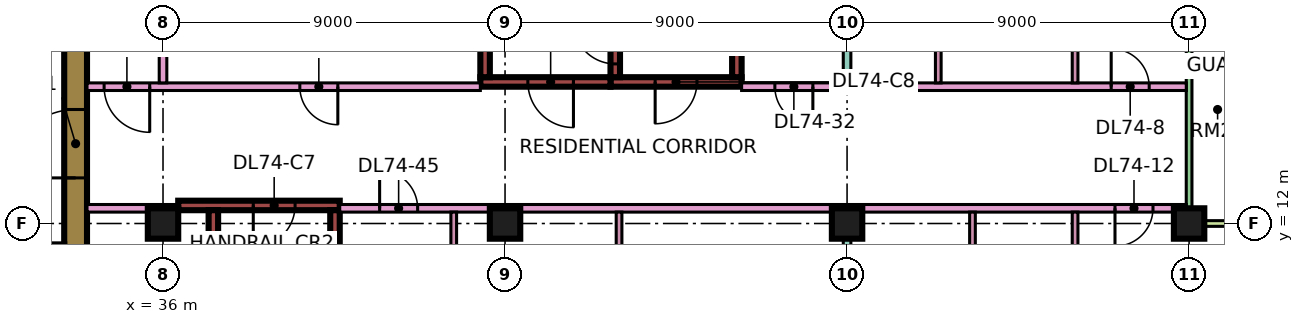
"""IFC4 building model, lengths in metres.
Left out: names, types, materials, properties, quantities, classifications, styles, units other than length and angle.
Written with IfcOpenShell. Run it as: python <this file> out.ifc"""

import sys

from ifc_helpers import new_model, si_unit, direction, frame, frame_2d, origin, origin_2d, place, context, subcontext, project, spatial, rectangle, extrude, element, fill, save


model = new_model("IFC4")
c1 = context("Model", 3, precision=1e-05, world=origin(), true_north=direction((0.0, 1.0)))
c2 = subcontext(c1, "Body", "Model", "MODEL_VIEW")
j1 = project(units=[si_unit("LENGTHUNIT", "METRE"), si_unit("PLANEANGLEUNIT", "RADIAN")], contexts=[c1])
p1 = place(None, origin())
s1 = spatial("IfcSite", under=j1, at=p1, CompositionType="ELEMENT")
p2 = place(p1, origin())
s2 = spatial("IfcBuilding", under=s1, at=p2, CompositionType="ELEMENT")
p3 = place(p2, frame((0.0, 0.0, 314.65)))
s3 = spatial("IfcBuildingStorey", under=s2, at=p3, CompositionType="ELEMENT", Elevation=314.65)
for number, where, z_axis, x_axis in (
    (1, (36.0, 12.0, 0.0), (0.0, 0.0, 1.0), (1.0, 0.0, 0.0)),
    (2, (45.0, 12.0, 0.0), (0.0, 0.0, 1.0), (1.0, 0.0, 0.0)),
    (3, (54.0, 12.0, 0.0), (0.0, 0.0, 1.0), (1.0, 0.0, 0.0)),
    (4, (63.0, 12.0, 0.0), (0.0, 0.0, 1.0), (1.0, 0.0, 0.0)),
):
    element("IfcColumn", number, at=place(p3, frame(where, z_axis=z_axis, x_axis=x_axis)), inside=s3, PredefinedType="COLUMN", context=c2, shape_type="SweptSolid", body=[
        extrude(rectangle(XDim=0.8, YDim=0.8, at=origin_2d()), origin(), (0.0, 0.0, 1.0), 3.75),
    ])
p4 = place(p3, frame((33.7, 7.6, 0.0), z_axis=(0.0, 0.0, 1.0), x_axis=(0.0, 1.0, 0.0)))
e5 = element("IfcWall", 5, at=p4, inside=s3, PredefinedType="SHEAR", context=c2, shape_type="SweptSolid", body=[
    extrude(rectangle(XDim=11.8, YDim=0.6, at=frame_2d((5.9, 0.0))), origin(), (0.0, 0.0, 1.0), 3.75),
])
p5 = place(p4, frame((5.6, 0.0, 0.0)))
e6 = element("IfcOpeningElement", 6, at=p5, cuts=e5, PredefinedType="OPENING", context=c2, shape_type="SweptSolid", body=[
    extrude(rectangle(XDim=1.8, YDim=2.4, at=frame_2d((0.9, 1.2))), frame((0.0, 0.31, 0.0), z_axis=(0.0, -1.0, 0.0), x_axis=(1.0, 0.0, 0.0)), (0.0, 0.0, 1.0), 0.62),
])
p6 = place(p3, frame((36.4, 12.475, 0.0), z_axis=(0.0, 0.0, 1.0), x_axis=(1.0, 0.0, 0.0)))
e7 = element("IfcWall", 7, at=p6, inside=s3, PredefinedType="SHEAR", context=c2, shape_type="SweptSolid", body=[
    extrude(rectangle(XDim=4.25, YDim=0.25, at=frame_2d((2.125, 0.0))), origin(), (0.0, 0.0, 1.0), 3.75),
])
p7 = place(p6, frame((1.975, 0.0, 0.0)))
e8 = element("IfcOpeningElement", 8, at=p7, cuts=e7, PredefinedType="OPENING", context=c2, shape_type="SweptSolid", body=[
    extrude(rectangle(XDim=1.1, YDim=2.2, at=frame_2d((0.55, 1.1))), frame((0.0, 0.135, 0.0), z_axis=(0.0, -1.0, 0.0), x_axis=(1.0, 0.0, 0.0)), (0.0, 0.0, 1.0), 0.27),
])
for number, where, z_axis, x_axis in (
    (9, (37.325, 5.85, 0.0), (0.0, 0.0, 1.0), (0.0, 1.0, 0.0)),
    (10, (40.525, 5.85, 0.0), (0.0, 0.0, 1.0), (0.0, 1.0, 0.0)),
):
    element("IfcWall", number, at=place(p3, frame(where, z_axis=z_axis, x_axis=x_axis)), inside=s3, PredefinedType="SHEAR", context=c2, shape_type="SweptSolid", body=[
        extrude(rectangle(XDim=6.5, YDim=0.25, at=frame_2d((3.25, 0.0))), origin(), (0.0, 0.0, 1.0), 3.75),
    ])
p8 = place(p3, frame((47.775, 15.725, 0.0), z_axis=(0.0, 0.0, 1.0), x_axis=(1.0, 0.0, 0.0)))
e11 = element("IfcWall", 11, at=p8, inside=s3, PredefinedType="SHEAR", context=c2, shape_type="SweptSolid", body=[
    extrude(rectangle(XDim=3.45, YDim=0.25, at=frame_2d((1.725, 0.0))), origin(), (0.0, 0.0, 1.0), 3.75),
])
p9 = place(p8, frame((1.175, 0.0, 0.0)))
e12 = element("IfcOpeningElement", 12, at=p9, cuts=e11, PredefinedType="OPENING", context=c2, shape_type="SweptSolid", body=[
    extrude(rectangle(XDim=1.1, YDim=2.2, at=frame_2d((0.55, 1.1))), frame((0.0, 0.135, 0.0), z_axis=(0.0, -1.0, 0.0), x_axis=(1.0, 0.0, 0.0)), (0.0, 0.0, 1.0), 0.27),
])
p10 = place(p3, frame((47.9, 15.85, 0.0), z_axis=(0.0, 0.0, 1.0), x_axis=(0.0, 1.0, 0.0)))
e13 = element("IfcWall", 13, at=p10, inside=s3, PredefinedType="SHEAR", context=c2, shape_type="SweptSolid", body=[
    extrude(rectangle(XDim=6.5, YDim=0.25, at=frame_2d((3.25, 0.0))), origin(), (0.0, 0.0, 1.0), 3.75),
])
p11 = place(p10, frame((0.35, 0.0, 0.0)))
e14 = element("IfcOpeningElement", 14, at=p11, cuts=e13, PredefinedType="OPENING", context=c2, shape_type="SweptSolid", body=[
    extrude(rectangle(XDim=1.1, YDim=2.2, at=frame_2d((0.55, 1.1))), frame((0.0, 0.135, 0.0), z_axis=(0.0, -1.0, 0.0), x_axis=(1.0, 0.0, 0.0)), (0.0, 0.0, 1.0), 0.27),
])
p12 = place(p3, frame((51.1, 15.85, 0.0), z_axis=(0.0, 0.0, 1.0), x_axis=(0.0, 1.0, 0.0)))
e15 = element("IfcWall", 15, at=p12, inside=s3, PredefinedType="SHEAR", context=c2, shape_type="SweptSolid", body=[
    extrude(rectangle(XDim=6.5, YDim=0.25, at=frame_2d((3.25, 0.0))), origin(), (0.0, 0.0, 1.0), 3.75),
])
p13 = place(p3, frame((44.35, 15.725, 0.0), z_axis=(0.0, 0.0, 1.0), x_axis=(1.0, 0.0, 0.0)))
e16 = element("IfcWall", 16, at=p13, inside=s3, PredefinedType="SHEAR", context=c2, shape_type="SweptSolid", body=[
    extrude(rectangle(XDim=3.425, YDim=0.25, at=frame_2d((1.712, 0.0))), origin(), (0.0, 0.0, 1.0), 3.75),
])
p14 = place(p13, frame((1.25, 0.0, 0.0)))
e17 = element("IfcOpeningElement", 17, at=p14, cuts=e16, PredefinedType="OPENING", context=c2, shape_type="SweptSolid", body=[
    extrude(rectangle(XDim=1.2, YDim=2.2, at=frame_2d((0.6, 1.1))), frame((0.0, 0.135, 0.0), z_axis=(0.0, -1.0, 0.0), x_axis=(1.0, 0.0, 0.0)), (0.0, 0.0, 1.0), 0.27),
])
p15 = place(p3, frame((44.475, 15.85, 0.0), z_axis=(0.0, 0.0, 1.0), x_axis=(0.0, 1.0, 0.0)))
e18 = element("IfcWall", 18, at=p15, inside=s3, PredefinedType="SHEAR", context=c2, shape_type="SweptSolid", body=[
    extrude(rectangle(XDim=6.5, YDim=0.25, at=frame_2d((3.25, 0.0))), origin(), (0.0, 0.0, 1.0), 3.75),
])
p16 = place(p15, frame((1.75, 0.0, 0.0)))
e19 = element("IfcOpeningElement", 19, at=p16, cuts=e18, PredefinedType="OPENING", context=c2, shape_type="SweptSolid", body=[
    extrude(rectangle(XDim=1.1, YDim=2.2, at=frame_2d((0.55, 1.1))), frame((0.0, 0.135, 0.0), z_axis=(0.0, -1.0, 0.0), x_axis=(1.0, 0.0, 0.0)), (0.0, 0.0, 1.0), 0.27),
])
p17 = place(p15, frame((4.3, 0.0, 0.0)))
e20 = element("IfcOpeningElement", 20, at=p17, cuts=e18, PredefinedType="OPENING", context=c2, shape_type="SweptSolid", body=[
    extrude(rectangle(XDim=1.1, YDim=2.2, at=frame_2d((0.55, 1.1))), frame((0.0, 0.135, 0.0), z_axis=(0.0, -1.0, 0.0), x_axis=(1.0, 0.0, 0.0)), (0.0, 0.0, 1.0), 0.27),
])
p18 = place(p3, frame((63.0, 12.075, 0.0), z_axis=(0.0, 0.0, 1.0), x_axis=(0.0, 1.0, 0.0)))
e21 = element("IfcWall", 21, at=p18, inside=s3, PredefinedType="SOLIDWALL", context=c2, shape_type="SweptSolid", body=[
    extrude(rectangle(XDim=10.35, YDim=0.15, at=frame_2d((5.175, 0.0))), origin(), (0.0, 0.0, 1.0), 3.35),
])
p19 = place(p18, frame((6.038, 0.0, 0.0)))
e22 = element("IfcOpeningElement", 22, at=p19, cuts=e21, PredefinedType="OPENING", context=c2, shape_type="SweptSolid", body=[
    extrude(rectangle(XDim=1.8, YDim=2.4, at=frame_2d((0.9, 1.2))), frame((0.0, 0.085, 0.0), z_axis=(0.0, -1.0, 0.0), x_axis=(1.0, 0.0, 0.0)), (0.0, 0.0, 1.0), 0.17),
])
p20 = place(p3, frame((64.5, 12.0, 0.0), z_axis=(0.0, 0.0, 1.0), x_axis=(-1.0, 0.0, 0.0)))
e23 = element("IfcWall", 23, at=p20, inside=s3, PredefinedType="SOLIDWALL", context=c2, shape_type="SweptSolid", body=[
    extrude(rectangle(XDim=1.5, YDim=0.15, at=frame_2d((0.75, 0.0))), origin(), (0.0, 0.0, 1.0), 3.35),
])
p21 = place(p3, frame((34.0, 12.4, 0.0), z_axis=(0.0, 0.0, 1.0), x_axis=(1.0, 0.0, 0.0)))
e24 = element("IfcWall", 24, at=p21, inside=s3, PredefinedType="PARTITIONING", context=c2, shape_type="SweptSolid", body=[
    extrude(rectangle(XDim=2.401, YDim=0.2, at=frame_2d((1.2, 0.0))), origin(), (0.0, 0.0, 1.0), 3.35),
])
p22 = place(p3, frame((34.0, 15.6, 0.0), z_axis=(0.0, 0.0, 1.0), x_axis=(1.0, 0.0, 0.0)))
e25 = element("IfcWall", 25, at=p22, inside=s3, PredefinedType="PARTITIONING", context=c2, shape_type="SweptSolid", body=[
    extrude(rectangle(XDim=10.35, YDim=0.2, at=frame_2d((5.175, 0.0))), origin(), (0.0, 0.0, 1.0), 3.35),
])
p23 = place(p22, frame((5.6, 0.0, 0.0)))
e26 = element("IfcOpeningElement", 26, at=p23, cuts=e25, PredefinedType="OPENING", context=c2, shape_type="SweptSolid", body=[
    extrude(rectangle(XDim=1.0, YDim=2.1, at=frame_2d((0.5, 1.05))), frame((0.0, 0.11, 0.0), z_axis=(0.0, -1.0, 0.0), x_axis=(1.0, 0.0, 0.0)), (0.0, 0.0, 1.0), 0.22),
])
p24 = place(p22, frame((0.45, 0.0, 0.0)))
e27 = element("IfcOpeningElement", 27, at=p24, cuts=e25, PredefinedType="OPENING", context=c2, shape_type="SweptSolid", body=[
    extrude(rectangle(XDim=1.2, YDim=2.1, at=frame_2d((0.6, 1.05))), frame((0.0, 0.11, 0.0), z_axis=(0.0, -1.0, 0.0), x_axis=(1.0, 0.0, 0.0)), (0.0, 0.0, 1.0), 0.22),
])
p25 = place(p3, frame((36.0, 15.7, 0.0), z_axis=(0.0, 0.0, 1.0), x_axis=(0.0, 1.0, 0.0)))
e28 = element("IfcWall", 28, at=p25, inside=s3, PredefinedType="PARTITIONING", context=c2, shape_type="SweptSolid", body=[
    extrude(rectangle(XDim=8.3, YDim=0.2, at=frame_2d((4.15, 0.0))), origin(), (0.0, 0.0, 1.0), 3.35),
])
p26 = place(p3, frame((40.65, 12.4, 0.0), z_axis=(0.0, 0.0, 1.0), x_axis=(1.0, 0.0, 0.0)))
e29 = element("IfcWall", 29, at=p26, inside=s3, PredefinedType="PARTITIONING", context=c2, shape_type="SweptSolid", body=[
    extrude(rectangle(XDim=22.276, YDim=0.2, at=frame_2d((11.138, 0.0))), origin(), (0.0, 0.0, 1.0), 3.35),
])
p27 = place(p26, frame((20.4, 0.0, 0.0)))
e30 = element("IfcOpeningElement", 30, at=p27, cuts=e29, PredefinedType="OPENING", context=c2, shape_type="SweptSolid", body=[
    extrude(rectangle(XDim=1.0, YDim=2.1, at=frame_2d((0.5, 1.05))), frame((0.0, 0.11, 0.0), z_axis=(0.0, -1.0, 0.0), x_axis=(1.0, 0.0, 0.0)), (0.0, 0.0, 1.0), 0.22),
])
p28 = place(p26, frame((1.05, 0.0, 0.0)))
e31 = element("IfcOpeningElement", 31, at=p28, cuts=e29, PredefinedType="OPENING", context=c2, shape_type="SweptSolid", body=[
    extrude(rectangle(XDim=1.0, YDim=2.1, at=frame_2d((0.5, 1.05))), frame((0.0, 0.11, 0.0), z_axis=(0.0, -1.0, 0.0), x_axis=(1.0, 0.0, 0.0)), (0.0, 0.0, 1.0), 0.22),
])
p29 = place(p3, frame((43.65, 5.975, 0.0), z_axis=(0.0, 0.0, 1.0), x_axis=(0.0, 1.0, 0.0)))
e32 = element("IfcWall", 32, at=p29, inside=s3, PredefinedType="PARTITIONING", context=c2, shape_type="SweptSolid", body=[
    extrude(rectangle(XDim=6.325, YDim=0.15, at=frame_2d((3.163, 0.0))), origin(), (0.0, 0.0, 1.0), 3.35),
])
p30 = place(p29, frame((4.275, 0.0, 0.0)))
e33 = element("IfcOpeningElement", 33, at=p30, cuts=e32, PredefinedType="OPENING", context=c2, shape_type="SweptSolid", body=[
    extrude(rectangle(XDim=0.9, YDim=2.1, at=frame_2d((0.45, 1.05))), frame((0.0, 0.085, 0.0), z_axis=(0.0, -1.0, 0.0), x_axis=(1.0, 0.0, 0.0)), (0.0, 0.0, 1.0), 0.17),
])
p31 = place(p3, frame((48.0, 5.975, 0.0), z_axis=(0.0, 0.0, 1.0), x_axis=(0.0, 1.0, 0.0)))
e34 = element("IfcWall", 34, at=p31, inside=s3, PredefinedType="PARTITIONING", context=c2, shape_type="SweptSolid", body=[
    extrude(rectangle(XDim=6.325, YDim=0.15, at=frame_2d((3.163, 0.0))), origin(), (0.0, 0.0, 1.0), 3.35),
])
p32 = place(p3, frame((51.225, 15.6, 0.0), z_axis=(0.0, 0.0, 1.0), x_axis=(1.0, 0.0, 0.0)))
e35 = element("IfcWall", 35, at=p32, inside=s3, PredefinedType="PARTITIONING", context=c2, shape_type="SweptSolid", body=[
    extrude(rectangle(XDim=11.701, YDim=0.2, at=frame_2d((5.851, 0.0))), origin(), (0.0, 0.0, 1.0), 3.35),
])
p33 = place(p32, frame((9.725, 0.0, 0.0)))
e36 = element("IfcOpeningElement", 36, at=p33, cuts=e35, PredefinedType="OPENING", context=c2, shape_type="SweptSolid", body=[
    extrude(rectangle(XDim=1.0, YDim=2.1, at=frame_2d((0.5, 1.05))), frame((0.0, 0.11, 0.0), z_axis=(0.0, -1.0, 0.0), x_axis=(1.0, 0.0, 0.0)), (0.0, 0.0, 1.0), 0.22),
])
p34 = place(p32, frame((0.875, 0.0, 0.0)))
e37 = element("IfcOpeningElement", 37, at=p34, cuts=e35, PredefinedType="OPENING", context=c2, shape_type="SweptSolid", body=[
    extrude(rectangle(XDim=1.0, YDim=2.1, at=frame_2d((0.5, 1.05))), frame((0.0, 0.11, 0.0), z_axis=(0.0, -1.0, 0.0), x_axis=(1.0, 0.0, 0.0)), (0.0, 0.0, 1.0), 0.22),
])
p35 = place(p3, frame((54.0, 0.0, 0.0), z_axis=(0.0, 0.0, 1.0), x_axis=(0.0, 1.0, 0.0)))
e38 = element("IfcWall", 38, at=p35, inside=s3, PredefinedType="PARTITIONING", context=c2, shape_type="SweptSolid", body=[
    extrude(rectangle(XDim=12.3, YDim=0.2, at=frame_2d((6.15, 0.0))), origin(), (0.0, 0.0, 1.0), 3.35),
])
p36 = place(p3, frame((54.0, 15.7, 0.0), z_axis=(0.0, 0.0, 1.0), x_axis=(0.0, 1.0, 0.0)))
e39 = element("IfcWall", 39, at=p36, inside=s3, PredefinedType="PARTITIONING", context=c2, shape_type="SweptSolid", body=[
    extrude(rectangle(XDim=8.3, YDim=0.2, at=frame_2d((4.15, 0.0))), origin(), (0.0, 0.0, 1.0), 3.35),
])
p37 = place(p3, frame((56.4, 15.7, 0.0), z_axis=(0.0, 0.0, 1.0), x_axis=(0.0, 1.0, 0.0)))
e40 = element("IfcWall", 40, at=p37, inside=s3, PredefinedType="PARTITIONING", context=c2, shape_type="SweptSolid", body=[
    extrude(rectangle(XDim=2.525, YDim=0.15, at=frame_2d((1.263, 0.0))), origin(), (0.0, 0.0, 1.0), 3.35),
])
p38 = place(p3, frame((57.3, 7.075, 0.0), z_axis=(0.0, 0.0, 1.0), x_axis=(0.0, 1.0, 0.0)))
e41 = element("IfcWall", 41, at=p38, inside=s3, PredefinedType="PARTITIONING", context=c2, shape_type="SweptSolid", body=[
    extrude(rectangle(XDim=5.225, YDim=0.15, at=frame_2d((2.613, 0.0))), origin(), (0.0, 0.0, 1.0), 3.35),
])
p39 = place(p3, frame((60.0, 7.075, 0.0), z_axis=(0.0, 0.0, 1.0), x_axis=(0.0, 1.0, 0.0)))
e42 = element("IfcWall", 42, at=p39, inside=s3, PredefinedType="PARTITIONING", context=c2, shape_type="SweptSolid", body=[
    extrude(rectangle(XDim=5.225, YDim=0.15, at=frame_2d((2.613, 0.0))), origin(), (0.0, 0.0, 1.0), 3.35),
])
p40 = place(p39, frame((2.275, 0.0, 0.0)))
e43 = element("IfcOpeningElement", 43, at=p40, cuts=e42, PredefinedType="OPENING", context=c2, shape_type="SweptSolid", body=[
    extrude(rectangle(XDim=0.8, YDim=2.1, at=frame_2d((0.4, 1.05))), frame((0.0, 0.085, 0.0), z_axis=(0.0, -1.0, 0.0), x_axis=(1.0, 0.0, 0.0)), (0.0, 0.0, 1.0), 0.17),
])
p41 = place(p3, frame((60.0, 15.7, 0.0), z_axis=(0.0, 0.0, 1.0), x_axis=(0.0, 1.0, 0.0)))
e44 = element("IfcWall", 44, at=p41, inside=s3, PredefinedType="PARTITIONING", context=c2, shape_type="SweptSolid", body=[
    extrude(rectangle(XDim=2.525, YDim=0.15, at=frame_2d((1.263, 0.0))), origin(), (0.0, 0.0, 1.0), 3.35),
])
p42 = place(p41, frame((0.9, 0.0, 0.0)))
e45 = element("IfcOpeningElement", 45, at=p42, cuts=e44, PredefinedType="OPENING", context=c2, shape_type="SweptSolid", body=[
    extrude(rectangle(XDim=0.8, YDim=2.1, at=frame_2d((0.4, 1.05))), frame((0.0, 0.085, 0.0), z_axis=(0.0, -1.0, 0.0), x_axis=(1.0, 0.0, 0.0)), (0.0, 0.0, 1.0), 0.17),
])
p43 = place(p5, origin())
e46 = element("IfcDoor", 46, at=p43, inside=s3, OperationType="DOUBLE_DOOR_SINGLE_SWING", PredefinedType="DOOR", context=c2, shape_type="SweptSolid", body=[
    extrude(rectangle(XDim=1.8, YDim=2.4, at=frame_2d((0.9, 1.2))), frame((0.0, 0.025, 0.0), z_axis=(0.0, -1.0, 0.0), x_axis=(1.0, 0.0, 0.0)), (0.0, 0.0, 1.0), 0.05),
])
fill(e6, e46)
p44 = place(p7, frame((1.1, 0.0, 0.0), z_axis=(0.0, 0.0, 1.0), x_axis=(-1.0, 0.0, 0.0)))
e47 = element("IfcDoor", 47, at=p44, inside=s3, OperationType="SINGLE_SWING_LEFT", PredefinedType="DOOR", context=c2, shape_type="SweptSolid", body=[
    extrude(rectangle(XDim=1.1, YDim=2.2, at=frame_2d((0.55, 1.1))), frame((0.0, 0.025, 0.0), z_axis=(0.0, -1.0, 0.0), x_axis=(1.0, 0.0, 0.0)), (0.0, 0.0, 1.0), 0.05),
])
fill(e8, e47)
p45 = place(p9, frame((1.1, 0.0, 0.0), z_axis=(0.0, 0.0, 1.0), x_axis=(-1.0, 0.0, 0.0)))
e48 = element("IfcDoor", 48, at=p45, inside=s3, OperationType="SINGLE_SWING_LEFT", PredefinedType="DOOR", context=c2, shape_type="SweptSolid", body=[
    extrude(rectangle(XDim=1.1, YDim=2.2, at=frame_2d((0.55, 1.1))), frame((0.0, 0.025, 0.0), z_axis=(0.0, -1.0, 0.0), x_axis=(1.0, 0.0, 0.0)), (0.0, 0.0, 1.0), 0.05),
])
fill(e12, e48)
p46 = place(p14, origin())
e49 = element("IfcDoor", 49, at=p46, inside=s3, OperationType="SINGLE_SWING_RIGHT", PredefinedType="DOOR", context=c2, shape_type="SweptSolid", body=[
    extrude(rectangle(XDim=1.2, YDim=2.2, at=frame_2d((0.6, 1.1))), frame((0.0, 0.025, 0.0), z_axis=(0.0, -1.0, 0.0), x_axis=(1.0, 0.0, 0.0)), (0.0, 0.0, 1.0), 0.05),
])
fill(e17, e49)
p47 = place(p11, frame((1.1, 0.0, 0.0), z_axis=(0.0, 0.0, 1.0), x_axis=(-1.0, 0.0, 0.0)))
e50 = element("IfcDoor", 50, at=p47, inside=s3, OperationType="SINGLE_SWING_RIGHT", PredefinedType="DOOR", context=c2, shape_type="SweptSolid", body=[
    extrude(rectangle(XDim=1.1, YDim=2.2, at=frame_2d((0.55, 1.1))), frame((0.0, 0.025, 0.0), z_axis=(0.0, -1.0, 0.0), x_axis=(1.0, 0.0, 0.0)), (0.0, 0.0, 1.0), 0.05),
])
fill(e14, e50)
p48 = place(p23, origin())
e51 = element("IfcDoor", 51, at=p48, inside=s3, OperationType="SINGLE_SWING_RIGHT", PredefinedType="DOOR", context=c2, shape_type="SweptSolid", body=[
    extrude(rectangle(XDim=1.0, YDim=2.1, at=frame_2d((0.5, 1.05))), frame((0.0, 0.025, 0.0), z_axis=(0.0, -1.0, 0.0), x_axis=(1.0, 0.0, 0.0)), (0.0, 0.0, 1.0), 0.05),
])
fill(e26, e51)
p49 = place(p33, origin())
e52 = element("IfcDoor", 52, at=p49, inside=s3, OperationType="SINGLE_SWING_LEFT", PredefinedType="DOOR", context=c2, shape_type="SweptSolid", body=[
    extrude(rectangle(XDim=1.0, YDim=2.1, at=frame_2d((0.5, 1.05))), frame((0.0, 0.025, 0.0), z_axis=(0.0, -1.0, 0.0), x_axis=(1.0, 0.0, 0.0)), (0.0, 0.0, 1.0), 0.05),
])
fill(e36, e52)
p50 = place(p27, frame((1.0, 0.0, 0.0), z_axis=(0.0, 0.0, 1.0), x_axis=(-1.0, 0.0, 0.0)))
e53 = element("IfcDoor", 53, at=p50, inside=s3, OperationType="SINGLE_SWING_LEFT", PredefinedType="DOOR", context=c2, shape_type="SweptSolid", body=[
    extrude(rectangle(XDim=1.0, YDim=2.1, at=frame_2d((0.5, 1.05))), frame((0.0, 0.025, 0.0), z_axis=(0.0, -1.0, 0.0), x_axis=(1.0, 0.0, 0.0)), (0.0, 0.0, 1.0), 0.05),
])
fill(e30, e53)
p51 = place(p24, origin())
e54 = element("IfcDoor", 54, at=p51, inside=s3, OperationType="SINGLE_SWING_RIGHT", PredefinedType="DOOR", context=c2, shape_type="SweptSolid", body=[
    extrude(rectangle(XDim=1.2, YDim=2.1, at=frame_2d((0.6, 1.05))), frame((0.0, 0.025, 0.0), z_axis=(0.0, -1.0, 0.0), x_axis=(1.0, 0.0, 0.0)), (0.0, 0.0, 1.0), 0.05),
])
fill(e27, e54)
p52 = place(p34, origin())
e55 = element("IfcDoor", 55, at=p52, inside=s3, OperationType="SINGLE_SWING_RIGHT", PredefinedType="DOOR", context=c2, shape_type="SweptSolid", body=[
    extrude(rectangle(XDim=1.0, YDim=2.1, at=frame_2d((0.5, 1.05))), frame((0.0, 0.025, 0.0), z_axis=(0.0, -1.0, 0.0), x_axis=(1.0, 0.0, 0.0)), (0.0, 0.0, 1.0), 0.05),
])
fill(e37, e55)
p53 = place(p28, origin())
e56 = element("IfcDoor", 56, at=p53, inside=s3, OperationType="SINGLE_SWING_LEFT", PredefinedType="DOOR", context=c2, shape_type="SweptSolid", body=[
    extrude(rectangle(XDim=1.0, YDim=2.1, at=frame_2d((0.5, 1.05))), frame((0.0, 0.025, 0.0), z_axis=(0.0, -1.0, 0.0), x_axis=(1.0, 0.0, 0.0)), (0.0, 0.0, 1.0), 0.05),
])
fill(e31, e56)
save(model, sys.argv[1])
